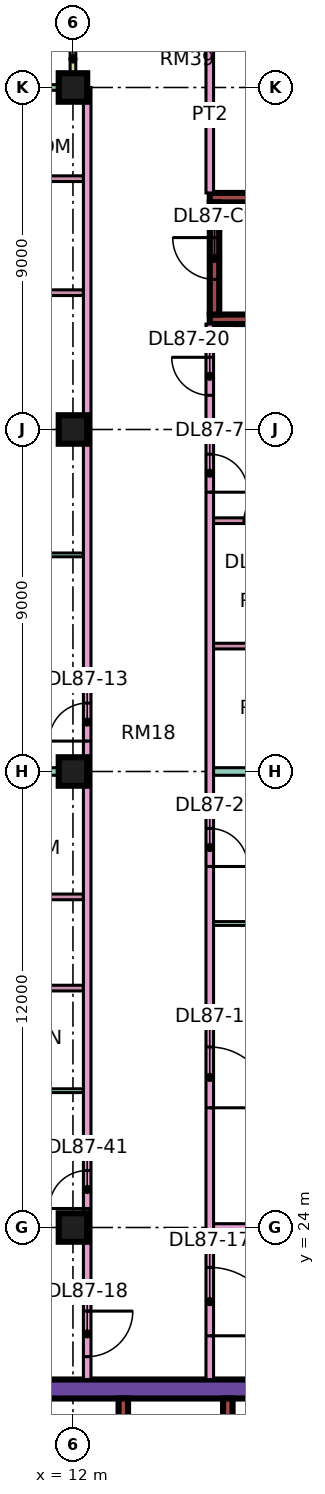
"""IFC4 building model, lengths in metres.
Left out: names, types, materials, properties, quantities, classifications, styles, units other than length and angle.
Written with IfcOpenShell. Run it as: python <this file> out.ifc"""

import sys

from ifc_helpers import new_model, si_unit, direction, frame, frame_2d, origin, origin_2d, place, context, subcontext, project, spatial, rectangle, extrude, element, fill, save


model = new_model("IFC4")
c1 = context("Model", 3, precision=1e-05, world=origin(), true_north=direction((0.0, 1.0)))
c2 = subcontext(c1, "Body", "Model", "MODEL_VIEW")
j1 = project(units=[si_unit("LENGTHUNIT", "METRE"), si_unit("PLANEANGLEUNIT", "RADIAN")], contexts=[c1])
p1 = place(None, origin())
s1 = spatial("IfcSite", under=j1, at=p1, CompositionType="ELEMENT")
p2 = place(p1, origin())
s2 = spatial("IfcBuilding", under=s1, at=p2, CompositionType="ELEMENT")
p3 = place(p2, frame((0.0, 0.0, 372.65)))
s3 = spatial("IfcBuildingStorey", under=s2, at=p3, CompositionType="ELEMENT", Elevation=372.65)
for number, where, z_axis, x_axis in (
    (1, (12.0, 24.0, 0.0), (0.0, 0.0, 1.0), (1.0, 0.0, 0.0)),
    (2, (12.0, 36.0, 0.0), (0.0, 0.0, 1.0), (1.0, 0.0, 0.0)),
    (3, (12.0, 45.0, 0.0), (0.0, 0.0, 1.0), (1.0, 0.0, 0.0)),
    (4, (12.0, 54.0, 0.0), (0.0, 0.0, 1.0), (1.0, 0.0, 0.0)),
):
    element("IfcColumn", number, at=place(p3, frame(where, z_axis=z_axis, x_axis=x_axis)), inside=s3, PredefinedType="COLUMN", context=c2, shape_type="SweptSolid", body=[
        extrude(rectangle(XDim=0.75, YDim=0.75, at=origin_2d()), origin(), (0.0, 0.0, 1.0), 3.75),
    ])
p4 = place(p3, frame((9.0, 19.75, 0.0), z_axis=(0.0, 0.0, 1.0), x_axis=(1.0, 0.0, 0.0)))
e5 = element("IfcWall", 5, at=p4, inside=s3, PredefinedType="SHEAR", context=c2, shape_type="SweptSolid", body=[
    extrude(rectangle(XDim=25.0, YDim=0.5, at=frame_2d((12.5, 0.0))), origin(), (0.0, 0.0, 1.0), 3.75),
])
p5 = place(p4, frame((19.1, 0.0, 0.0)))
e6 = element("IfcOpeningElement", 6, at=p5, cuts=e5, PredefinedType="OPENING", context=c2, shape_type="SweptSolid", body=[
    extrude(rectangle(XDim=1.8, YDim=2.4, at=frame_2d((0.9, 1.2))), frame((0.0, 0.26, 0.0), z_axis=(0.0, -1.0, 0.0), x_axis=(1.0, 0.0, 0.0)), (0.0, 0.0, 1.0), 0.52),
])
p6 = place(p3, frame((13.325, 7.5, 0.0), z_axis=(0.0, 0.0, 1.0), x_axis=(0.0, 1.0, 0.0)))
e7 = element("IfcWall", 7, at=p6, inside=s3, PredefinedType="SHEAR", context=c2, shape_type="SweptSolid", body=[
    extrude(rectangle(XDim=12.0, YDim=0.25, at=frame_2d((6.0, 0.0))), origin(), (0.0, 0.0, 1.0), 3.75),
])
p7 = place(p3, frame((16.075, 15.8, 0.0), z_axis=(0.0, 0.0, 1.0), x_axis=(0.0, 1.0, 0.0)))
e8 = element("IfcWall", 8, at=p7, inside=s3, PredefinedType="SHEAR", context=c2, shape_type="SweptSolid", body=[
    extrude(rectangle(XDim=3.7, YDim=0.25, at=frame_2d((1.85, 0.0))), origin(), (0.0, 0.0, 1.0), 3.75),
])
for number, where, z_axis, x_axis in (
    (9, (15.6, 47.9, 0.0), (0.0, 0.0, 1.0), (1.0, 0.0, 0.0)),
    (10, (15.6, 51.1, 0.0), (0.0, 0.0, 1.0), (1.0, 0.0, 0.0)),
):
    element("IfcWall", number, at=place(p3, frame(where, z_axis=z_axis, x_axis=x_axis)), inside=s3, PredefinedType="SHEAR", context=c2, shape_type="SweptSolid", body=[
        extrude(rectangle(XDim=7.0, YDim=0.25, at=frame_2d((3.5, 0.0))), origin(), (0.0, 0.0, 1.0), 3.75),
    ])
p8 = place(p3, frame((15.725, 48.025, 0.0), z_axis=(0.0, 0.0, 1.0), x_axis=(0.0, 1.0, 0.0)))
e11 = element("IfcWall", 11, at=p8, inside=s3, PredefinedType="SHEAR", context=c2, shape_type="SweptSolid", body=[
    extrude(rectangle(XDim=2.95, YDim=0.25, at=frame_2d((1.475, 0.0))), origin(), (0.0, 0.0, 1.0), 3.75),
])
p9 = place(p8, frame((0.925, 0.0, 0.0)))
e12 = element("IfcOpeningElement", 12, at=p9, cuts=e11, PredefinedType="OPENING", context=c2, shape_type="SweptSolid", body=[
    extrude(rectangle(XDim=1.1, YDim=2.2, at=frame_2d((0.55, 1.1))), frame((0.0, 0.135, 0.0), z_axis=(0.0, -1.0, 0.0), x_axis=(1.0, 0.0, 0.0)), (0.0, 0.0, 1.0), 0.27),
])
p10 = place(p3, frame((11.925, 54.0, 0.0), z_axis=(0.0, 0.0, 1.0), x_axis=(-1.0, 0.0, 0.0)))
e13 = element("IfcWall", 13, at=p10, inside=s3, PredefinedType="SOLIDWALL", context=c2, shape_type="SweptSolid", body=[
    extrude(rectangle(XDim=10.35, YDim=0.15, at=frame_2d((5.175, 0.0))), origin(), (0.0, 0.0, 1.0), 3.35),
])
p11 = place(p10, frame((7.05, 0.0, 0.0)))
e14 = element("IfcOpeningElement", 14, at=p11, cuts=e13, PredefinedType="OPENING", context=c2, shape_type="SweptSolid", body=[
    extrude(rectangle(XDim=1.8, YDim=2.4, at=frame_2d((0.9, 1.2))), frame((0.0, 0.085, 0.0), z_axis=(0.0, -1.0, 0.0), x_axis=(1.0, 0.0, 0.0)), (0.0, 0.0, 1.0), 0.17),
])
p12 = place(p3, frame((12.0, 55.5, 0.0), z_axis=(0.0, 0.0, 1.0), x_axis=(0.0, -1.0, 0.0)))
e15 = element("IfcWall", 15, at=p12, inside=s3, PredefinedType="SOLIDWALL", context=c2, shape_type="SweptSolid", body=[
    extrude(rectangle(XDim=1.5, YDim=0.15, at=frame_2d((0.75, 0.0))), origin(), (0.0, 0.0, 1.0), 3.35),
])
p13 = place(p3, frame((-1.35, 22.4, 0.0), z_axis=(0.0, 0.0, 1.0), x_axis=(1.0, 0.0, 0.0)))
e16 = element("IfcWall", 16, at=p13, inside=s3, PredefinedType="PARTITIONING", context=c2, shape_type="SweptSolid", body=[
    extrude(rectangle(XDim=13.625, YDim=0.2, at=frame_2d((6.812, 0.0))), origin(), (0.0, 0.0, 1.0), 3.35),
])
p14 = place(p3, frame((0.0, 36.0, 0.0), z_axis=(0.0, 0.0, 1.0), x_axis=(1.0, 0.0, 0.0)))
e17 = element("IfcWall", 17, at=p14, inside=s3, PredefinedType="PARTITIONING", context=c2, shape_type="SweptSolid", body=[
    extrude(rectangle(XDim=12.275, YDim=0.2, at=frame_2d((6.137, 0.0))), origin(), (0.0, 0.0, 1.0), 3.35),
])
p15 = place(p3, frame((7.05, 27.6, 0.0), z_axis=(0.0, 0.0, 1.0), x_axis=(1.0, 0.0, 0.0)))
e18 = element("IfcWall", 18, at=p15, inside=s3, PredefinedType="PARTITIONING", context=c2, shape_type="SweptSolid", body=[
    extrude(rectangle(XDim=5.225, YDim=0.1, at=frame_2d((2.612, 0.0))), origin(), (0.0, 0.0, 1.0), 3.35),
])
for number, where, z_axis, x_axis in (
    (19, (7.05, 30.3, 0.0), (0.0, 0.0, 1.0), (1.0, 0.0, 0.0)),
    (20, (7.05, 32.7, 0.0), (0.0, 0.0, 1.0), (1.0, 0.0, 0.0)),
):
    element("IfcWall", number, at=place(p3, frame(where, z_axis=z_axis, x_axis=x_axis)), inside=s3, PredefinedType="PARTITIONING", context=c2, shape_type="SweptSolid", body=[
        extrude(rectangle(XDim=5.225, YDim=0.15, at=frame_2d((2.612, 0.0))), origin(), (0.0, 0.0, 1.0), 3.35),
    ])
p16 = place(p3, frame((7.65, 41.7, 0.0), z_axis=(0.0, 0.0, 1.0), x_axis=(1.0, 0.0, 0.0)))
e21 = element("IfcWall", 21, at=p16, inside=s3, PredefinedType="PARTITIONING", context=c2, shape_type="SweptSolid", body=[
    extrude(rectangle(XDim=4.625, YDim=0.1, at=frame_2d((2.312, 0.0))), origin(), (0.0, 0.0, 1.0), 3.35),
])
for number, where, z_axis, x_axis in (
    (22, (7.65, 48.6, 0.0), (0.0, 0.0, 1.0), (1.0, 0.0, 0.0)),
    (23, (7.65, 51.6, 0.0), (0.0, 0.0, 1.0), (1.0, 0.0, 0.0)),
):
    element("IfcWall", number, at=place(p3, frame(where, z_axis=z_axis, x_axis=x_axis)), inside=s3, PredefinedType="PARTITIONING", context=c2, shape_type="SweptSolid", body=[
        extrude(rectangle(XDim=4.625, YDim=0.15, at=frame_2d((2.312, 0.0))), origin(), (0.0, 0.0, 1.0), 3.35),
    ])
p17 = place(p3, frame((12.375, 20.0, 0.0), z_axis=(0.0, 0.0, 1.0), x_axis=(0.0, 1.0, 0.0)))
e24 = element("IfcWall", 24, at=p17, inside=s3, PredefinedType="PARTITIONING", context=c2, shape_type="SweptSolid", body=[
    extrude(rectangle(XDim=34.0, YDim=0.2, at=frame_2d((17.0, 0.0))), origin(), (0.0, 0.0, 1.0), 3.35),
])
p18 = place(p17, frame((16.8, 0.0, 0.0)))
e25 = element("IfcOpeningElement", 25, at=p18, cuts=e24, PredefinedType="OPENING", context=c2, shape_type="SweptSolid", body=[
    extrude(rectangle(XDim=1.0, YDim=2.1, at=frame_2d((0.5, 1.05))), frame((0.0, 0.11, 0.0), z_axis=(0.0, -1.0, 0.0), x_axis=(1.0, 0.0, 0.0)), (0.0, 0.0, 1.0), 0.22),
])
p19 = place(p17, frame((0.6, 0.0, 0.0)))
e26 = element("IfcOpeningElement", 26, at=p19, cuts=e24, PredefinedType="OPENING", context=c2, shape_type="SweptSolid", body=[
    extrude(rectangle(XDim=1.2, YDim=2.1, at=frame_2d((0.6, 1.05))), frame((0.0, 0.11, 0.0), z_axis=(0.0, -1.0, 0.0), x_axis=(1.0, 0.0, 0.0)), (0.0, 0.0, 1.0), 0.22),
])
p20 = place(p17, frame((4.5, 0.0, 0.0)))
e27 = element("IfcOpeningElement", 27, at=p20, cuts=e24, PredefinedType="OPENING", context=c2, shape_type="SweptSolid", body=[
    extrude(rectangle(XDim=1.0, YDim=2.1, at=frame_2d((0.5, 1.05))), frame((0.0, 0.11, 0.0), z_axis=(0.0, -1.0, 0.0), x_axis=(1.0, 0.0, 0.0)), (0.0, 0.0, 1.0), 0.22),
])
p21 = place(p3, frame((15.6, 20.0, 0.0), z_axis=(0.0, 0.0, 1.0), x_axis=(0.0, 1.0, 0.0)))
e28 = element("IfcWall", 28, at=p21, inside=s3, PredefinedType="PARTITIONING", context=c2, shape_type="SweptSolid", body=[
    extrude(rectangle(XDim=27.775, YDim=0.2, at=frame_2d((13.887, 0.0))), origin(), (0.0, 0.0, 1.0), 3.35),
])
p22 = place(p21, frame((7.15, 0.0, 0.0)))
e29 = element("IfcOpeningElement", 29, at=p22, cuts=e28, PredefinedType="OPENING", context=c2, shape_type="SweptSolid", body=[
    extrude(rectangle(XDim=1.6, YDim=2.1, at=frame_2d((0.8, 1.05))), frame((0.0, 0.11, 0.0), z_axis=(0.0, -1.0, 0.0), x_axis=(1.0, 0.0, 0.0)), (0.0, 0.0, 1.0), 0.22),
])
p23 = place(p21, frame((13.5, 0.0, 0.0)))
e30 = element("IfcOpeningElement", 30, at=p23, cuts=e28, PredefinedType="OPENING", context=c2, shape_type="SweptSolid", body=[
    extrude(rectangle(XDim=1.0, YDim=2.1, at=frame_2d((0.5, 1.05))), frame((0.0, 0.11, 0.0), z_axis=(0.0, -1.0, 0.0), x_axis=(1.0, 0.0, 0.0)), (0.0, 0.0, 1.0), 0.22),
])
p24 = place(p21, frame((23.35, 0.0, 0.0)))
e31 = element("IfcOpeningElement", 31, at=p24, cuts=e28, PredefinedType="OPENING", context=c2, shape_type="SweptSolid", body=[
    extrude(rectangle(XDim=1.0, YDim=2.1, at=frame_2d((0.5, 1.05))), frame((0.0, 0.11, 0.0), z_axis=(0.0, -1.0, 0.0), x_axis=(1.0, 0.0, 0.0)), (0.0, 0.0, 1.0), 0.22),
])
p25 = place(p21, frame((1.15, 0.0, 0.0)))
e32 = element("IfcOpeningElement", 32, at=p25, cuts=e28, PredefinedType="OPENING", context=c2, shape_type="SweptSolid", body=[
    extrude(rectangle(XDim=1.8, YDim=2.1, at=frame_2d((0.9, 1.05))), frame((0.0, 0.11, 0.0), z_axis=(0.0, -1.0, 0.0), x_axis=(1.0, 0.0, 0.0)), (0.0, 0.0, 1.0), 0.22),
])
p26 = place(p21, frame((25.9, 0.0, 0.0)))
e33 = element("IfcOpeningElement", 33, at=p26, cuts=e28, PredefinedType="OPENING", context=c2, shape_type="SweptSolid", body=[
    extrude(rectangle(XDim=1.0, YDim=2.1, at=frame_2d((0.5, 1.05))), frame((0.0, 0.11, 0.0), z_axis=(0.0, -1.0, 0.0), x_axis=(1.0, 0.0, 0.0)), (0.0, 0.0, 1.0), 0.22),
])
p27 = place(p3, frame((15.6, 51.225, 0.0), z_axis=(0.0, 0.0, 1.0), x_axis=(0.0, 1.0, 0.0)))
e34 = element("IfcWall", 34, at=p27, inside=s3, PredefinedType="PARTITIONING", context=c2, shape_type="SweptSolid", body=[
    extrude(rectangle(XDim=4.125, YDim=0.2, at=frame_2d((2.062, 0.0))), origin(), (0.0, 0.0, 1.0), 3.35),
])
p28 = place(p3, frame((15.7, 24.0, 0.0), z_axis=(0.0, 0.0, 1.0), x_axis=(1.0, 0.0, 0.0)))
e35 = element("IfcWall", 35, at=p28, inside=s3, PredefinedType="PARTITIONING", context=c2, shape_type="SweptSolid", body=[
    extrude(rectangle(XDim=5.8, YDim=0.2, at=frame_2d((2.9, 0.0))), origin(), (0.0, 0.0, 1.0), 3.35),
])
p29 = place(p3, frame((15.7, 32.0, 0.0), z_axis=(0.0, 0.0, 1.0), x_axis=(1.0, 0.0, 0.0)))
e36 = element("IfcWall", 36, at=p29, inside=s3, PredefinedType="PARTITIONING", context=c2, shape_type="SweptSolid", body=[
    extrude(rectangle(XDim=5.8, YDim=0.1, at=frame_2d((2.9, 0.0))), origin(), (0.0, 0.0, 1.0), 3.35),
])
p30 = place(p3, frame((15.7, 36.0, 0.0), z_axis=(0.0, 0.0, 1.0), x_axis=(1.0, 0.0, 0.0)))
e37 = element("IfcWall", 37, at=p30, inside=s3, PredefinedType="PARTITIONING", context=c2, shape_type="SweptSolid", body=[
    extrude(rectangle(XDim=8.3, YDim=0.2, at=frame_2d((4.15, 0.0))), origin(), (0.0, 0.0, 1.0), 3.35),
])
p31 = place(p3, frame((15.7, 39.3, 0.0), z_axis=(0.0, 0.0, 1.0), x_axis=(1.0, 0.0, 0.0)))
e38 = element("IfcWall", 38, at=p31, inside=s3, PredefinedType="PARTITIONING", context=c2, shape_type="SweptSolid", body=[
    extrude(rectangle(XDim=2.525, YDim=0.15, at=frame_2d((1.263, 0.0))), origin(), (0.0, 0.0, 1.0), 3.35),
])
p32 = place(p3, frame((15.7, 42.6, 0.0), z_axis=(0.0, 0.0, 1.0), x_axis=(1.0, 0.0, 0.0)))
e39 = element("IfcWall", 39, at=p32, inside=s3, PredefinedType="PARTITIONING", context=c2, shape_type="SweptSolid", body=[
    extrude(rectangle(XDim=2.525, YDim=0.15, at=frame_2d((1.263, 0.0))), origin(), (0.0, 0.0, 1.0), 3.35),
])
p33 = place(p32, frame((0.8, 0.0, 0.0)))
e40 = element("IfcOpeningElement", 40, at=p33, cuts=e39, PredefinedType="OPENING", context=c2, shape_type="SweptSolid", body=[
    extrude(rectangle(XDim=0.8, YDim=2.1, at=frame_2d((0.4, 1.05))), frame((0.0, 0.085, 0.0), z_axis=(0.0, -1.0, 0.0), x_axis=(1.0, 0.0, 0.0)), (0.0, 0.0, 1.0), 0.17),
])
p34 = place(p3, frame((15.7, 45.0, 0.0), z_axis=(0.0, 0.0, 1.0), x_axis=(1.0, 0.0, 0.0)))
e41 = element("IfcWall", 41, at=p34, inside=s3, PredefinedType="PARTITIONING", context=c2, shape_type="SweptSolid", body=[
    extrude(rectangle(XDim=8.3, YDim=0.2, at=frame_2d((4.15, 0.0))), origin(), (0.0, 0.0, 1.0), 3.35),
])
p35 = place(p9, frame((1.1, 0.0, 0.0), z_axis=(0.0, 0.0, 1.0), x_axis=(-1.0, 0.0, 0.0)))
e42 = element("IfcDoor", 42, at=p35, inside=s3, OperationType="SINGLE_SWING_RIGHT", PredefinedType="DOOR", context=c2, shape_type="SweptSolid", body=[
    extrude(rectangle(XDim=1.1, YDim=2.2, at=frame_2d((0.55, 1.1))), frame((0.0, 0.025, 0.0), z_axis=(0.0, -1.0, 0.0), x_axis=(1.0, 0.0, 0.0)), (0.0, 0.0, 1.0), 0.05),
])
fill(e12, e42)
p36 = place(p22, frame((1.6, 0.0, 0.0), z_axis=(0.0, 0.0, 1.0), x_axis=(-1.0, 0.0, 0.0)))
e43 = element("IfcDoor", 43, at=p36, inside=s3, OperationType="DOUBLE_DOOR_SINGLE_SWING", PredefinedType="DOOR", context=c2, shape_type="SweptSolid", body=[
    extrude(rectangle(XDim=1.6, YDim=2.1, at=frame_2d((0.8, 1.05))), frame((0.0, 0.025, 0.0), z_axis=(0.0, -1.0, 0.0), x_axis=(1.0, 0.0, 0.0)), (0.0, 0.0, 1.0), 0.05),
])
fill(e29, e43)
p37 = place(p23, frame((1.0, 0.0, 0.0), z_axis=(0.0, 0.0, 1.0), x_axis=(-1.0, 0.0, 0.0)))
e44 = element("IfcDoor", 44, at=p37, inside=s3, OperationType="SINGLE_SWING_LEFT", PredefinedType="DOOR", context=c2, shape_type="SweptSolid", body=[
    extrude(rectangle(XDim=1.0, YDim=2.1, at=frame_2d((0.5, 1.05))), frame((0.0, 0.025, 0.0), z_axis=(0.0, -1.0, 0.0), x_axis=(1.0, 0.0, 0.0)), (0.0, 0.0, 1.0), 0.05),
])
fill(e30, e44)
p38 = place(p33, frame((0.8, 0.0, 0.0), z_axis=(0.0, 0.0, 1.0), x_axis=(-1.0, 0.0, 0.0)))
e45 = element("IfcDoor", 45, at=p38, inside=s3, OperationType="SINGLE_SWING_RIGHT", PredefinedType="DOOR", context=c2, shape_type="SweptSolid", body=[
    extrude(rectangle(XDim=0.8, YDim=2.1, at=frame_2d((0.4, 1.05))), frame((0.0, 0.025, 0.0), z_axis=(0.0, -1.0, 0.0), x_axis=(1.0, 0.0, 0.0)), (0.0, 0.0, 1.0), 0.05),
])
fill(e40, e45)
p39 = place(p24, frame((1.0, 0.0, 0.0), z_axis=(0.0, 0.0, 1.0), x_axis=(-1.0, 0.0, 0.0)))
e46 = element("IfcDoor", 46, at=p39, inside=s3, OperationType="SINGLE_SWING_LEFT", PredefinedType="DOOR", context=c2, shape_type="SweptSolid", body=[
    extrude(rectangle(XDim=1.0, YDim=2.1, at=frame_2d((0.5, 1.05))), frame((0.0, 0.025, 0.0), z_axis=(0.0, -1.0, 0.0), x_axis=(1.0, 0.0, 0.0)), (0.0, 0.0, 1.0), 0.05),
])
fill(e31, e46)
p40 = place(p18, origin())
e47 = element("IfcDoor", 47, at=p40, inside=s3, OperationType="SINGLE_SWING_LEFT", PredefinedType="DOOR", context=c2, shape_type="SweptSolid", body=[
    extrude(rectangle(XDim=1.0, YDim=2.1, at=frame_2d((0.5, 1.05))), frame((0.0, 0.025, 0.0), z_axis=(0.0, -1.0, 0.0), x_axis=(1.0, 0.0, 0.0)), (0.0, 0.0, 1.0), 0.05),
])
fill(e25, e47)
p41 = place(p25, frame((1.8, 0.0, 0.0), z_axis=(0.0, 0.0, 1.0), x_axis=(-1.0, 0.0, 0.0)))
e48 = element("IfcDoor", 48, at=p41, inside=s3, OperationType="DOUBLE_DOOR_SINGLE_SWING", PredefinedType="DOOR", context=c2, shape_type="SweptSolid", body=[
    extrude(rectangle(XDim=1.8, YDim=2.1, at=frame_2d((0.9, 1.05))), frame((0.0, 0.025, 0.0), z_axis=(0.0, -1.0, 0.0), x_axis=(1.0, 0.0, 0.0)), (0.0, 0.0, 1.0), 0.05),
])
fill(e32, e48)
p42 = place(p19, origin())
e49 = element("IfcDoor", 49, at=p42, inside=s3, OperationType="SINGLE_SWING_RIGHT", PredefinedType="DOOR", context=c2, shape_type="SweptSolid", body=[
    extrude(rectangle(XDim=1.2, YDim=2.1, at=frame_2d((0.6, 1.05))), frame((0.0, 0.025, 0.0), z_axis=(0.0, -1.0, 0.0), x_axis=(1.0, 0.0, 0.0)), (0.0, 0.0, 1.0), 0.05),
])
fill(e26, e49)
p43 = place(p26, frame((1.0, 0.0, 0.0), z_axis=(0.0, 0.0, 1.0), x_axis=(-1.0, 0.0, 0.0)))
e50 = element("IfcDoor", 50, at=p43, inside=s3, OperationType="SINGLE_SWING_RIGHT", PredefinedType="DOOR", context=c2, shape_type="SweptSolid", body=[
    extrude(rectangle(XDim=1.0, YDim=2.1, at=frame_2d((0.5, 1.05))), frame((0.0, 0.025, 0.0), z_axis=(0.0, -1.0, 0.0), x_axis=(1.0, 0.0, 0.0)), (0.0, 0.0, 1.0), 0.05),
])
fill(e33, e50)
p44 = place(p20, origin())
e51 = element("IfcDoor", 51, at=p44, inside=s3, OperationType="SINGLE_SWING_LEFT", PredefinedType="DOOR", context=c2, shape_type="SweptSolid", body=[
    extrude(rectangle(XDim=1.0, YDim=2.1, at=frame_2d((0.5, 1.05))), frame((0.0, 0.025, 0.0), z_axis=(0.0, -1.0, 0.0), x_axis=(1.0, 0.0, 0.0)), (0.0, 0.0, 1.0), 0.05),
])
fill(e27, e51)
save(model, sys.argv[1])
